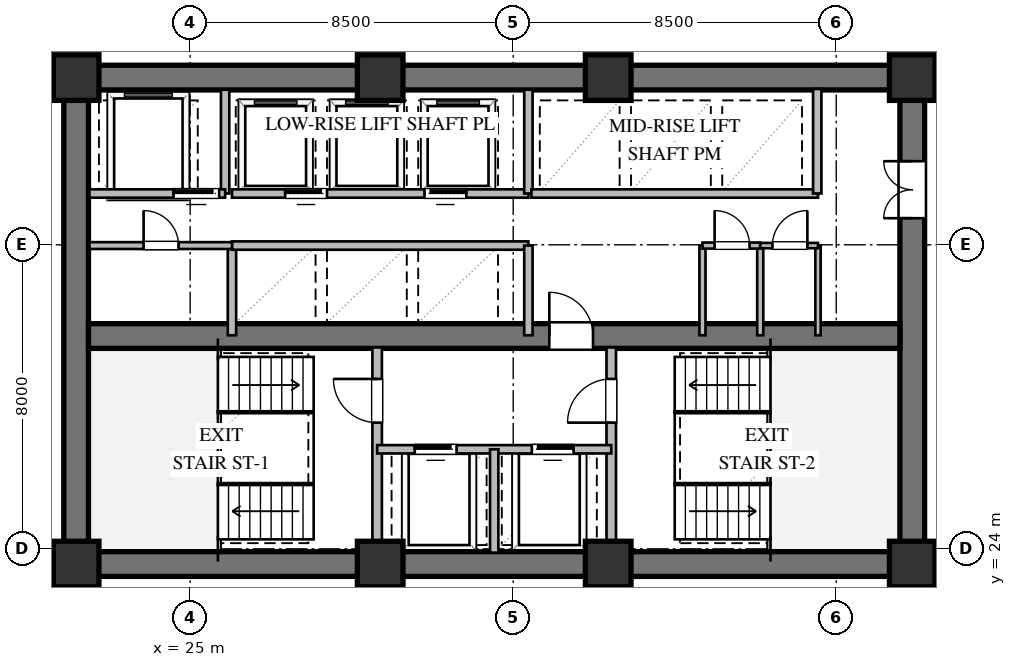
"""IFC4 building model, lengths in metres.
Left out: names, types, materials, properties, quantities, classifications, styles, units other than length and angle.
Written with IfcOpenShell. Run it as: python <this file> out.ifc"""

import sys

from ifc_helpers import new_model, si_unit, direction, frame, frame_2d, origin, origin_2d, place, context, subcontext, project, spatial, rectangle, extrude, element, fill, save


model = new_model("IFC4")
c1 = context("Model", 3, precision=1e-05, world=origin(), true_north=direction((0.0, 1.0)))
c2 = subcontext(c1, "Body", "Model", "MODEL_VIEW")
j1 = project(units=[si_unit("LENGTHUNIT", "METRE"), si_unit("PLANEANGLEUNIT", "RADIAN")], contexts=[c1])
p1 = place(None, origin())
s1 = spatial("IfcSite", under=j1, at=p1, CompositionType="ELEMENT")
p2 = place(p1, origin())
s2 = spatial("IfcBuilding", under=s1, at=p2, CompositionType="ELEMENT")
p3 = place(p2, frame((0.0, 0.0, 31.2)))
s3 = spatial("IfcBuildingStorey", under=s2, at=p3, CompositionType="ELEMENT", Elevation=31.2)
for number, where, z_axis, x_axis in (
    (1, (21.675, 23.6, 0.0), (0.0, 0.0, 1.0), (1.0, 0.0, 0.0)),
    (2, (21.675, 36.4, 0.0), (0.0, 0.0, 1.0), (1.0, 0.0, 0.0)),
):
    element("IfcWall", number, at=place(p3, frame(where, z_axis=z_axis, x_axis=x_axis)), inside=s3, PredefinedType="SHEAR", context=c2, shape_type="SweptSolid", body=[
        extrude(rectangle(XDim=22.65, YDim=0.65, at=frame_2d((11.325, 0.0))), origin(), (0.0, 0.0, 1.0), 3.36),
    ])
p4 = place(p3, frame((22.0, 23.925, 0.0), z_axis=(0.0, 0.0, 1.0), x_axis=(0.0, 1.0, 0.0)))
e3 = element("IfcWall", 3, at=p4, inside=s3, PredefinedType="SHEAR", context=c2, shape_type="SweptSolid", body=[
    extrude(rectangle(XDim=12.15, YDim=0.65, at=frame_2d((6.075, 0.0))), origin(), (0.0, 0.0, 1.0), 3.36),
])
p5 = place(p3, frame((44.0, 23.925, 0.0), z_axis=(0.0, 0.0, 1.0), x_axis=(0.0, 1.0, 0.0)))
e4 = element("IfcWall", 4, at=p5, inside=s3, PredefinedType="SHEAR", context=c2, shape_type="SweptSolid", body=[
    extrude(rectangle(XDim=12.15, YDim=0.65, at=frame_2d((6.075, 0.0))), origin(), (0.0, 0.0, 1.0), 3.36),
])
p6 = place(p5, frame((8.775, 0.0, 0.0)))
e5 = element("IfcOpeningElement", 5, at=p6, cuts=e4, PredefinedType="OPENING", context=c2, shape_type="SweptSolid", body=[
    extrude(rectangle(XDim=1.5, YDim=2.15, at=frame_2d((0.75, 1.075))), frame((0.0, 0.335, 0.0), z_axis=(0.0, -1.0, 0.0), x_axis=(1.0, 0.0, 0.0)), (0.0, 0.0, 1.0), 0.67),
])
p7 = place(p3, frame((22.325, 29.6, 0.0), z_axis=(0.0, 0.0, 1.0), x_axis=(1.0, 0.0, 0.0)))
e6 = element("IfcWall", 6, at=p7, inside=s3, PredefinedType="SHEAR", context=c2, shape_type="SweptSolid", body=[
    extrude(rectangle(XDim=21.35, YDim=0.65, at=frame_2d((10.675, 0.0))), origin(), (0.0, 0.0, 1.0), 3.36),
])
p8 = place(p7, frame((12.125, 0.0, 0.0)))
e7 = element("IfcOpeningElement", 7, at=p8, cuts=e6, PredefinedType="OPENING", context=c2, shape_type="SweptSolid", body=[
    extrude(rectangle(XDim=1.15, YDim=2.1, at=frame_2d((0.575, 1.05))), frame((0.0, 0.335, 0.0), z_axis=(0.0, -1.0, 0.0), x_axis=(1.0, 0.0, 0.0)), (0.0, 0.0, 1.0), 0.67),
])
for number, where, z_axis, x_axis in (
    (8, (22.0, 23.6, 0.0), (0.0, 0.0, 1.0), (1.0, 0.0, 0.0)),
    (9, (30.0, 23.6, 0.0), (0.0, 0.0, 1.0), (1.0, 0.0, 0.0)),
    (10, (36.0, 23.6, 0.0), (0.0, 0.0, 1.0), (1.0, 0.0, 0.0)),
    (11, (44.0, 23.6, 0.0), (0.0, 0.0, 1.0), (1.0, 0.0, 0.0)),
    (12, (44.0, 36.4, 0.0), (0.0, 0.0, 1.0), (1.0, 0.0, 0.0)),
    (13, (36.0, 36.4, 0.0), (0.0, 0.0, 1.0), (1.0, 0.0, 0.0)),
    (14, (30.0, 36.4, 0.0), (0.0, 0.0, 1.0), (1.0, 0.0, 0.0)),
    (15, (22.0, 36.4, 0.0), (0.0, 0.0, 1.0), (1.0, 0.0, 0.0)),
):
    element("IfcColumn", number, at=place(p3, frame(where, z_axis=z_axis, x_axis=x_axis)), inside=s3, PredefinedType="COLUMN", context=c2, shape_type="SweptSolid", body=[
        extrude(rectangle(XDim=1.2, YDim=1.2, at=origin_2d()), origin(), (0.0, 0.0, 1.0), 3.6),
    ])
p9 = place(p3, frame((29.92, 23.9, 0.0), z_axis=(0.0, 0.0, 1.0), x_axis=(0.0, 1.0, 0.0)))
e16 = element("IfcWall", 16, at=p9, inside=s3, PredefinedType="SOLIDWALL", context=c2, shape_type="SweptSolid", body=[
    extrude(rectangle(XDim=5.4, YDim=0.25, at=frame_2d((2.7, 0.0))), origin(), (0.0, 0.0, 1.0), 3.36),
])
p10 = place(p9, frame((3.421, 0.0, 0.0)))
e17 = element("IfcOpeningElement", 17, at=p10, cuts=e16, PredefinedType="OPENING", context=c2, shape_type="SweptSolid", body=[
    extrude(rectangle(XDim=1.15, YDim=2.1, at=frame_2d((0.575, 1.05))), frame((0.0, 0.135, 0.0), z_axis=(0.0, -1.0, 0.0), x_axis=(1.0, 0.0, 0.0)), (0.0, 0.0, 1.0), 0.27),
])
p11 = place(p3, frame((36.08, 23.9, 0.0), z_axis=(0.0, 0.0, 1.0), x_axis=(0.0, 1.0, 0.0)))
e18 = element("IfcWall", 18, at=p11, inside=s3, PredefinedType="SOLIDWALL", context=c2, shape_type="SweptSolid", body=[
    extrude(rectangle(XDim=5.4, YDim=0.25, at=frame_2d((2.7, 0.0))), origin(), (0.0, 0.0, 1.0), 3.36),
])
p12 = place(p11, frame((3.421, 0.0, 0.0)))
e19 = element("IfcOpeningElement", 19, at=p12, cuts=e18, PredefinedType="OPENING", context=c2, shape_type="SweptSolid", body=[
    extrude(rectangle(XDim=1.15, YDim=2.1, at=frame_2d((0.575, 1.05))), frame((0.0, 0.135, 0.0), z_axis=(0.0, -1.0, 0.0), x_axis=(1.0, 0.0, 0.0)), (0.0, 0.0, 1.0), 0.27),
])
p13 = place(p3, frame((29.92, 26.62, 0.0), z_axis=(0.0, 0.0, 1.0), x_axis=(1.0, 0.0, 0.0)))
e20 = element("IfcWall", 20, at=p13, inside=s3, PredefinedType="SOLIDWALL", context=c2, shape_type="SweptSolid", body=[
    extrude(rectangle(XDim=6.16, YDim=0.22, at=frame_2d((3.08, 0.0))), origin(), (0.0, 0.0, 1.0), 3.36),
])
p14 = place(p13, frame((0.99, 0.0, 0.0)))
e21 = element("IfcOpeningElement", 21, at=p14, cuts=e20, PredefinedType="OPENING", context=c2, shape_type="SweptSolid", body=[
    extrude(rectangle(XDim=1.1, YDim=2.1, at=frame_2d((0.55, 1.05))), frame((0.0, 0.12, 0.0), z_axis=(0.0, -1.0, 0.0), x_axis=(1.0, 0.0, 0.0)), (0.0, 0.0, 1.0), 0.24),
])
p15 = place(p13, frame((4.07, 0.0, 0.0)))
e22 = element("IfcOpeningElement", 22, at=p15, cuts=e20, PredefinedType="OPENING", context=c2, shape_type="SweptSolid", body=[
    extrude(rectangle(XDim=1.1, YDim=2.1, at=frame_2d((0.55, 1.05))), frame((0.0, 0.12, 0.0), z_axis=(0.0, -1.0, 0.0), x_axis=(1.0, 0.0, 0.0)), (0.0, 0.0, 1.0), 0.24),
])
p16 = place(p3, frame((33.0, 23.9, 0.0), z_axis=(0.0, 0.0, 1.0), x_axis=(0.0, 1.0, 0.0)))
e23 = element("IfcWall", 23, at=p16, inside=s3, PredefinedType="SOLIDWALL", context=c2, shape_type="SweptSolid", body=[
    extrude(rectangle(XDim=2.72, YDim=0.22, at=frame_2d((1.36, 0.0))), origin(), (0.0, 0.0, 1.0), 3.36),
])
p17 = place(p3, frame((25.92, 33.35, 0.0), z_axis=(0.0, 0.0, 1.0), x_axis=(0.0, 1.0, 0.0)))
e24 = element("IfcWall", 24, at=p17, inside=s3, PredefinedType="SOLIDWALL", context=c2, shape_type="SweptSolid", body=[
    extrude(rectangle(XDim=2.73, YDim=0.22, at=frame_2d((1.365, 0.0))), origin(), (0.0, 0.0, 1.0), 3.36),
])
p18 = place(p3, frame((22.35, 33.35, 0.0), z_axis=(0.0, 0.0, 1.0), x_axis=(1.0, 0.0, 0.0)))
e25 = element("IfcWall", 25, at=p18, inside=s3, PredefinedType="SOLIDWALL", context=c2, shape_type="SweptSolid", body=[
    extrude(rectangle(XDim=3.57, YDim=0.22, at=frame_2d((1.785, 0.0))), origin(), (0.0, 0.0, 1.0), 3.36),
])
p19 = place(p18, frame((2.213, 0.0, 0.0)))
e26 = element("IfcOpeningElement", 26, at=p19, cuts=e25, PredefinedType="OPENING", context=c2, shape_type="SweptSolid", body=[
    extrude(rectangle(XDim=1.2, YDim=2.1, at=frame_2d((0.6, 1.05))), frame((0.0, 0.12, 0.0), z_axis=(0.0, -1.0, 0.0), x_axis=(1.0, 0.0, 0.0)), (0.0, 0.0, 1.0), 0.24),
])
p20 = place(p3, frame((26.1, 29.62, 0.0), z_axis=(0.0, 0.0, 1.0), x_axis=(0.0, 1.0, 0.0)))
e27 = element("IfcWall", 27, at=p20, inside=s3, PredefinedType="SOLIDWALL", context=c2, shape_type="SweptSolid", body=[
    extrude(rectangle(XDim=2.36, YDim=0.22, at=frame_2d((1.18, 0.0))), origin(), (0.0, 0.0, 1.0), 3.36),
])
p21 = place(p3, frame((26.1, 31.98, 0.0), z_axis=(0.0, 0.0, 1.0), x_axis=(1.0, 0.0, 0.0)))
e28 = element("IfcWall", 28, at=p21, inside=s3, PredefinedType="SOLIDWALL", context=c2, shape_type="SweptSolid", body=[
    extrude(rectangle(XDim=7.8, YDim=0.22, at=frame_2d((3.9, 0.0))), origin(), (0.0, 0.0, 1.0), 3.36),
])
p22 = place(p3, frame((33.9, 29.62, 0.0), z_axis=(0.0, 0.0, 1.0), x_axis=(0.0, 1.0, 0.0)))
e29 = element("IfcWall", 29, at=p22, inside=s3, PredefinedType="SOLIDWALL", context=c2, shape_type="SweptSolid", body=[
    extrude(rectangle(XDim=2.36, YDim=0.22, at=frame_2d((1.18, 0.0))), origin(), (0.0, 0.0, 1.0), 3.36),
])
p23 = place(p3, frame((26.1, 33.35, 0.0), z_axis=(0.0, 0.0, 1.0), x_axis=(1.0, 0.0, 0.0)))
e30 = element("IfcWall", 30, at=p23, inside=s3, PredefinedType="SOLIDWALL", context=c2, shape_type="SweptSolid", body=[
    extrude(rectangle(XDim=7.8, YDim=0.22, at=frame_2d((3.9, 0.0))), origin(), (0.0, 0.0, 1.0), 3.36),
])
p24 = place(p23, frame((1.4, 0.0, 0.0)))
e31 = element("IfcOpeningElement", 31, at=p24, cuts=e30, PredefinedType="OPENING", context=c2, shape_type="SweptSolid", body=[
    extrude(rectangle(XDim=1.1, YDim=2.1, at=frame_2d((0.55, 1.05))), frame((0.0, 0.12, 0.0), z_axis=(0.0, -1.0, 0.0), x_axis=(1.0, 0.0, 0.0)), (0.0, 0.0, 1.0), 0.24),
])
p25 = place(p23, frame((5.066, 0.0, 0.0)))
e32 = element("IfcOpeningElement", 32, at=p25, cuts=e30, PredefinedType="OPENING", context=c2, shape_type="SweptSolid", body=[
    extrude(rectangle(XDim=1.1, YDim=2.1, at=frame_2d((0.55, 1.05))), frame((0.0, 0.12, 0.0), z_axis=(0.0, -1.0, 0.0), x_axis=(1.0, 0.0, 0.0)), (0.0, 0.0, 1.0), 0.24),
])
p26 = place(p3, frame((33.9, 33.35, 0.0), z_axis=(0.0, 0.0, 1.0), x_axis=(0.0, 1.0, 0.0)))
e33 = element("IfcWall", 33, at=p26, inside=s3, PredefinedType="SOLIDWALL", context=c2, shape_type="SweptSolid", body=[
    extrude(rectangle(XDim=2.73, YDim=0.22, at=frame_2d((1.365, 0.0))), origin(), (0.0, 0.0, 1.0), 3.36),
])
p27 = place(p3, frame((33.98, 33.35, 0.0), z_axis=(0.0, 0.0, 1.0), x_axis=(1.0, 0.0, 0.0)))
e34 = element("IfcWall", 34, at=p27, inside=s3, PredefinedType="SOLIDWALL", context=c2, shape_type="SweptSolid", body=[
    extrude(rectangle(XDim=7.54, YDim=0.22, at=frame_2d((3.77, 0.0))), origin(), (0.0, 0.0, 1.0), 3.36),
])
p28 = place(p3, frame((41.5, 33.35, 0.0), z_axis=(0.0, 0.0, 1.0), x_axis=(0.0, 1.0, 0.0)))
e35 = element("IfcWall", 35, at=p28, inside=s3, PredefinedType="SOLIDWALL", context=c2, shape_type="SweptSolid", body=[
    extrude(rectangle(XDim=2.75, YDim=0.22, at=frame_2d((1.375, 0.0))), origin(), (0.0, 0.0, 1.0), 3.36),
])
p29 = place(p3, frame((22.35, 31.98, 0.0), z_axis=(0.0, 0.0, 1.0), x_axis=(1.0, 0.0, 0.0)))
e36 = element("IfcWall", 36, at=p29, inside=s3, PredefinedType="PARTITIONING", context=c2, shape_type="SweptSolid", body=[
    extrude(rectangle(XDim=3.75, YDim=0.18, at=frame_2d((1.875, 0.0))), origin(), (0.0, 0.0, 1.0), 3.36),
])
p30 = place(p29, frame((1.425, 0.0, 0.0)))
e37 = element("IfcOpeningElement", 37, at=p30, cuts=e36, PredefinedType="OPENING", context=c2, shape_type="SweptSolid", body=[
    extrude(rectangle(XDim=0.92, YDim=2.1, at=frame_2d((0.46, 1.05))), frame((0.0, 0.1, 0.0), z_axis=(0.0, -1.0, 0.0), x_axis=(1.0, 0.0, 0.0)), (0.0, 0.0, 1.0), 0.2),
])
for number, where, z_axis, x_axis in (
    (38, (38.48, 29.62, 0.0), (0.0, 0.0, 1.0), (0.0, 1.0, 0.0)),
    (39, (40.0, 29.62, 0.0), (0.0, 0.0, 1.0), (0.0, 1.0, 0.0)),
):
    element("IfcWall", number, at=place(p3, frame(where, z_axis=z_axis, x_axis=x_axis)), inside=s3, PredefinedType="PLUMBINGWALL", context=c2, shape_type="SweptSolid", body=[
        extrude(rectangle(XDim=2.36, YDim=0.16, at=frame_2d((1.18, 0.0))), origin(), (0.0, 0.0, 1.0), 3.36),
    ])
p31 = place(p3, frame((41.52, 29.62, 0.0), z_axis=(0.0, 0.0, 1.0), x_axis=(0.0, 1.0, 0.0)))
e40 = element("IfcWall", 40, at=p31, inside=s3, PredefinedType="PARTITIONING", context=c2, shape_type="SweptSolid", body=[
    extrude(rectangle(XDim=2.36, YDim=0.14, at=frame_2d((1.18, 0.0))), origin(), (0.0, 0.0, 1.0), 3.36),
])
p32 = place(p3, frame((38.48, 31.98, 0.0), z_axis=(0.0, 0.0, 1.0), x_axis=(1.0, 0.0, 0.0)))
e41 = element("IfcWall", 41, at=p32, inside=s3, PredefinedType="PLUMBINGWALL", context=c2, shape_type="SweptSolid", body=[
    extrude(rectangle(XDim=1.52, YDim=0.16, at=frame_2d((0.76, 0.0))), origin(), (0.0, 0.0, 1.0), 3.36),
])
p33 = place(p32, frame((0.32, 0.0, 0.0)))
e42 = element("IfcOpeningElement", 42, at=p33, cuts=e41, PredefinedType="OPENING", context=c2, shape_type="SweptSolid", body=[
    extrude(rectangle(XDim=0.92, YDim=2.1, at=frame_2d((0.46, 1.05))), frame((0.0, 0.09, 0.0), z_axis=(0.0, -1.0, 0.0), x_axis=(1.0, 0.0, 0.0)), (0.0, 0.0, 1.0), 0.18),
])
p34 = place(p3, frame((40.0, 31.98, 0.0), z_axis=(0.0, 0.0, 1.0), x_axis=(1.0, 0.0, 0.0)))
e43 = element("IfcWall", 43, at=p34, inside=s3, PredefinedType="PARTITIONING", context=c2, shape_type="SweptSolid", body=[
    extrude(rectangle(XDim=1.52, YDim=0.14, at=frame_2d((0.76, 0.0))), origin(), (0.0, 0.0, 1.0), 3.36),
])
p35 = place(p34, frame((0.32, 0.0, 0.0)))
e44 = element("IfcOpeningElement", 44, at=p35, cuts=e43, PredefinedType="OPENING", context=c2, shape_type="SweptSolid", body=[
    extrude(rectangle(XDim=0.92, YDim=2.1, at=frame_2d((0.46, 1.05))), frame((0.0, 0.08, 0.0), z_axis=(0.0, -1.0, 0.0), x_axis=(1.0, 0.0, 0.0)), (0.0, 0.0, 1.0), 0.16),
])
p36 = place(p10, origin())
e45 = element("IfcDoor", 45, at=p36, inside=s3, OperationType="SINGLE_SWING_RIGHT", PredefinedType="DOOR", context=c2, shape_type="SweptSolid", body=[
    extrude(rectangle(XDim=1.15, YDim=2.1, at=frame_2d((0.575, 1.05))), frame((0.0, 0.025, 0.0), z_axis=(0.0, -1.0, 0.0), x_axis=(1.0, 0.0, 0.0)), (0.0, 0.0, 1.0), 0.05),
])
fill(e17, e45)
p37 = place(p12, origin())
e46 = element("IfcDoor", 46, at=p37, inside=s3, OperationType="SINGLE_SWING_LEFT", PredefinedType="DOOR", context=c2, shape_type="SweptSolid", body=[
    extrude(rectangle(XDim=1.15, YDim=2.1, at=frame_2d((0.575, 1.05))), frame((0.0, 0.025, 0.0), z_axis=(0.0, -1.0, 0.0), x_axis=(1.0, 0.0, 0.0)), (0.0, 0.0, 1.0), 0.05),
])
fill(e19, e46)
p38 = place(p14, origin())
e47 = element("IfcDoor", 47, at=p38, inside=s3, OperationType="SLIDING_TO_LEFT", PredefinedType="DOOR", context=c2, shape_type="SweptSolid", body=[
    extrude(rectangle(XDim=1.1, YDim=2.1, at=frame_2d((0.55, 1.05))), frame((0.0, 0.025, 0.0), z_axis=(0.0, -1.0, 0.0), x_axis=(1.0, 0.0, 0.0)), (0.0, 0.0, 1.0), 0.05),
])
fill(e21, e47)
p39 = place(p15, origin())
e48 = element("IfcDoor", 48, at=p39, inside=s3, OperationType="SLIDING_TO_RIGHT", PredefinedType="DOOR", context=c2, shape_type="SweptSolid", body=[
    extrude(rectangle(XDim=1.1, YDim=2.1, at=frame_2d((0.55, 1.05))), frame((0.0, 0.025, 0.0), z_axis=(0.0, -1.0, 0.0), x_axis=(1.0, 0.0, 0.0)), (0.0, 0.0, 1.0), 0.05),
])
fill(e22, e48)
p40 = place(p8, origin())
e49 = element("IfcDoor", 49, at=p40, inside=s3, OperationType="SINGLE_SWING_LEFT", PredefinedType="DOOR", context=c2, shape_type="SweptSolid", body=[
    extrude(rectangle(XDim=1.15, YDim=2.1, at=frame_2d((0.575, 1.05))), frame((0.0, 0.025, 0.0), z_axis=(0.0, -1.0, 0.0), x_axis=(1.0, 0.0, 0.0)), (0.0, 0.0, 1.0), 0.05),
])
fill(e7, e49)
p41 = place(p6, origin())
e50 = element("IfcDoor", 50, at=p41, inside=s3, OperationType="DOUBLE_DOOR_SINGLE_SWING", PredefinedType="DOOR", context=c2, shape_type="SweptSolid", body=[
    extrude(rectangle(XDim=1.5, YDim=2.15, at=frame_2d((0.75, 1.075))), frame((0.0, 0.025, 0.0), z_axis=(0.0, -1.0, 0.0), x_axis=(1.0, 0.0, 0.0)), (0.0, 0.0, 1.0), 0.05),
])
fill(e5, e50)
p42 = place(p19, origin())
e51 = element("IfcDoor", 51, at=p42, inside=s3, OperationType="SLIDING_TO_LEFT", PredefinedType="DOOR", context=c2, shape_type="SweptSolid", body=[
    extrude(rectangle(XDim=1.2, YDim=2.1, at=frame_2d((0.6, 1.05))), frame((0.0, 0.025, 0.0), z_axis=(0.0, -1.0, 0.0), x_axis=(1.0, 0.0, 0.0)), (0.0, 0.0, 1.0), 0.05),
])
fill(e26, e51)
p43 = place(p24, origin())
e52 = element("IfcDoor", 52, at=p43, inside=s3, OperationType="SLIDING_TO_LEFT", PredefinedType="DOOR", context=c2, shape_type="SweptSolid", body=[
    extrude(rectangle(XDim=1.1, YDim=2.1, at=frame_2d((0.55, 1.05))), frame((0.0, 0.025, 0.0), z_axis=(0.0, -1.0, 0.0), x_axis=(1.0, 0.0, 0.0)), (0.0, 0.0, 1.0), 0.05),
])
fill(e31, e52)
p44 = place(p25, origin())
e53 = element("IfcDoor", 53, at=p44, inside=s3, OperationType="SLIDING_TO_RIGHT", PredefinedType="DOOR", context=c2, shape_type="SweptSolid", body=[
    extrude(rectangle(XDim=1.1, YDim=2.1, at=frame_2d((0.55, 1.05))), frame((0.0, 0.025, 0.0), z_axis=(0.0, -1.0, 0.0), x_axis=(1.0, 0.0, 0.0)), (0.0, 0.0, 1.0), 0.05),
])
fill(e32, e53)
p45 = place(p30, origin())
e54 = element("IfcDoor", 54, at=p45, inside=s3, OperationType="SINGLE_SWING_LEFT", PredefinedType="DOOR", context=c2, shape_type="SweptSolid", body=[
    extrude(rectangle(XDim=0.92, YDim=2.1, at=frame_2d((0.46, 1.05))), frame((0.0, 0.025, 0.0), z_axis=(0.0, -1.0, 0.0), x_axis=(1.0, 0.0, 0.0)), (0.0, 0.0, 1.0), 0.05),
])
fill(e37, e54)
p46 = place(p33, origin())
e55 = element("IfcDoor", 55, at=p46, inside=s3, OperationType="SINGLE_SWING_LEFT", PredefinedType="DOOR", context=c2, shape_type="SweptSolid", body=[
    extrude(rectangle(XDim=0.92, YDim=2.1, at=frame_2d((0.46, 1.05))), frame((0.0, 0.025, 0.0), z_axis=(0.0, -1.0, 0.0), x_axis=(1.0, 0.0, 0.0)), (0.0, 0.0, 1.0), 0.05),
])
fill(e42, e55)
p47 = place(p35, origin())
e56 = element("IfcDoor", 56, at=p47, inside=s3, OperationType="SINGLE_SWING_RIGHT", PredefinedType="DOOR", context=c2, shape_type="SweptSolid", body=[
    extrude(rectangle(XDim=0.92, YDim=2.1, at=frame_2d((0.46, 1.05))), frame((0.0, 0.025, 0.0), z_axis=(0.0, -1.0, 0.0), x_axis=(1.0, 0.0, 0.0)), (0.0, 0.0, 1.0), 0.05),
])
fill(e44, e56)
save(model, sys.argv[1])
